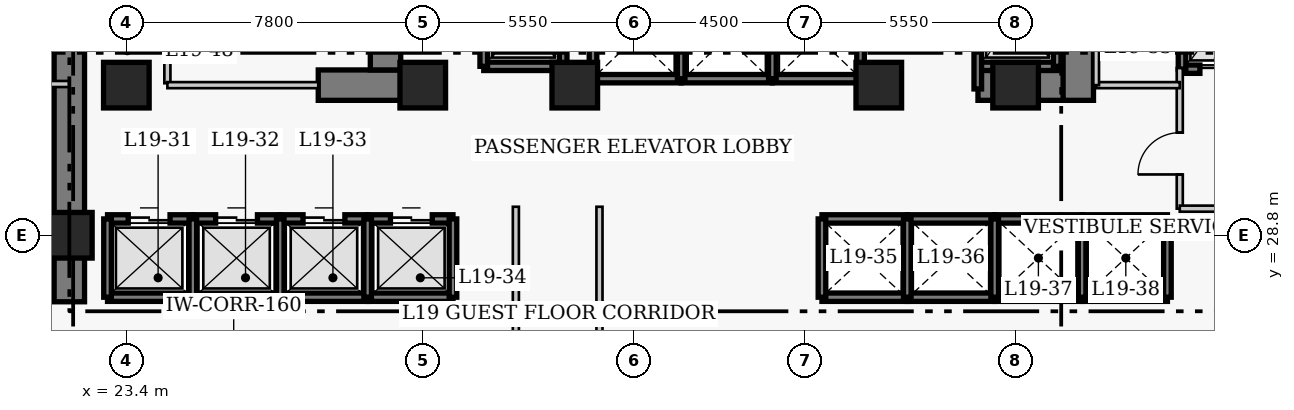
"""IFC4 building model, lengths in metres.
Left out: names, types, materials, properties, quantities, classifications, styles, units other than length and angle.
Written with IfcOpenShell. Run it as: python <this file> out.ifc"""

import sys

from ifc_helpers import new_model, si_unit, direction, frame, frame_2d, origin, origin_2d, place, context, subcontext, project, spatial, rectangle, extrude, element, fill, save


model = new_model("IFC4")
c1 = context("Model", 3, precision=1e-05, world=origin(), true_north=direction((0.0, 1.0)))
c2 = subcontext(c1, "Body", "Model", "MODEL_VIEW")
j1 = project(units=[si_unit("LENGTHUNIT", "METRE"), si_unit("PLANEANGLEUNIT", "RADIAN")], contexts=[c1])
p1 = place(None, origin())
s1 = spatial("IfcSite", under=j1, at=p1, CompositionType="ELEMENT")
p2 = place(p1, origin())
s2 = spatial("IfcBuilding", under=s1, at=p2, CompositionType="ELEMENT")
p3 = place(p2, frame((0.0, 0.0, 80.4)))
s3 = spatial("IfcBuildingStorey", under=s2, at=p3, CompositionType="ELEMENT", Elevation=80.4)
p4 = place(p3, frame((21.9, 27.05, 0.0), z_axis=(0.0, 0.0, 1.0), x_axis=(0.0, 1.0, 0.0)))
e1 = element("IfcWall", 1, at=p4, inside=s3, PredefinedType="SHEAR", context=c2, shape_type="SweptSolid", body=[
    extrude(rectangle(XDim=13.67, YDim=0.8, at=frame_2d((6.835, 0.0))), origin(), (0.0, 0.0, 1.0), 3.8),
])
p5 = place(p3, frame((28.45, 32.75, 0.0), z_axis=(0.0, 0.0, 1.0), x_axis=(1.0, 0.0, 0.0)))
e2 = element("IfcWall", 2, at=p5, inside=s3, PredefinedType="SHEAR", context=c2, shape_type="SweptSolid", body=[
    extrude(rectangle(XDim=2.4, YDim=0.8, at=frame_2d((1.2, 0.0))), origin(), (0.0, 0.0, 1.0), 3.8),
])
p6 = place(p3, frame((45.81, 32.75, 0.0), z_axis=(0.0, 0.0, 1.0), x_axis=(1.0, 0.0, 0.0)))
e3 = element("IfcWall", 3, at=p6, inside=s3, PredefinedType="SHEAR", context=c2, shape_type="SweptSolid", body=[
    extrude(rectangle(XDim=2.64, YDim=0.8, at=frame_2d((1.32, 0.0))), origin(), (0.0, 0.0, 1.0), 3.8),
])
p7 = place(p3, frame((30.22, 33.15, 0.0), z_axis=(0.0, 0.0, 1.0), x_axis=(0.0, 1.0, 0.0)))
e4 = element("IfcWall", 4, at=p7, inside=s3, PredefinedType="SHEAR", context=c2, shape_type="SweptSolid", body=[
    extrude(rectangle(XDim=7.17, YDim=0.8, at=frame_2d((3.585, 0.0))), origin(), (0.0, 0.0, 1.0), 3.8),
])
p8 = place(p3, frame((48.45, 32.35, 0.0), z_axis=(0.0, 0.0, 1.0), x_axis=(0.0, 1.0, 0.0)))
e5 = element("IfcWall", 5, at=p8, inside=s3, PredefinedType="SHEAR", context=c2, shape_type="SweptSolid", body=[
    extrude(rectangle(XDim=7.97, YDim=0.8, at=frame_2d((3.985, 0.0))), origin(), (0.0, 0.0, 1.0), 3.8),
])
p9 = place(p8, frame((5.85, 0.0, 0.0)))
e6 = element("IfcOpeningElement", 6, at=p9, cuts=e5, PredefinedType="OPENING", context=c2, shape_type="SweptSolid", body=[
    extrude(rectangle(XDim=1.1, YDim=2.15, at=frame_2d((0.55, 1.075))), frame((0.0, 0.41, 0.0), z_axis=(0.0, -1.0, 0.0), x_axis=(1.0, 0.0, 0.0)), (0.0, 0.0, 1.0), 0.82),
])
for number, where, z_axis, x_axis in (
    (7, (21.9, 28.8, 0.0), (0.0, 0.0, 1.0), (1.0, 0.0, 0.0)),
    (8, (23.4, 32.75, 0.0), (0.0, 0.0, 1.0), (1.0, 0.0, 0.0)),
    (9, (31.2, 32.75, 0.0), (0.0, 0.0, 1.0), (1.0, 0.0, 0.0)),
    (10, (35.2, 32.75, 0.0), (0.0, 0.0, 1.0), (1.0, 0.0, 0.0)),
    (11, (43.2, 32.75, 0.0), (0.0, 0.0, 1.0), (1.0, 0.0, 0.0)),
    (12, (46.8, 32.75, 0.0), (0.0, 0.0, 1.0), (1.0, 0.0, 0.0)),
):
    element("IfcColumn", number, at=place(p3, frame(where, z_axis=z_axis, x_axis=x_axis)), inside=s3, PredefinedType="COLUMN", context=c2, shape_type="SweptSolid", body=[
        extrude(rectangle(XDim=1.2, YDim=1.2, at=origin_2d()), origin(), (0.0, 0.0, 1.0), 3.8),
    ])
p10 = place(p3, frame((22.905, 29.23, 0.0), z_axis=(0.0, 0.0, 1.0), x_axis=(1.0, 0.0, 0.0)))
e13 = element("IfcWall", 13, at=p10, inside=s3, PredefinedType="SHEAR", context=c2, shape_type="SweptSolid", body=[
    extrude(rectangle(XDim=2.245, YDim=0.22, at=frame_2d((1.123, 0.0))), origin(), (0.0, 0.0, 1.0), 3.8),
])
p11 = place(p10, frame((0.545, 0.0, 0.0)))
e14 = element("IfcOpeningElement", 14, at=p11, cuts=e13, PredefinedType="OPENING", context=c2, shape_type="SweptSolid", body=[
    extrude(rectangle(XDim=1.1, YDim=2.15, at=frame_2d((0.55, 1.075))), frame((0.0, 0.12, 0.0), z_axis=(0.0, -1.0, 0.0), x_axis=(1.0, 0.0, 0.0)), (0.0, 0.0, 1.0), 0.24),
])
p12 = place(p3, frame((22.905, 27.17, 0.0), z_axis=(0.0, 0.0, 1.0), x_axis=(1.0, 0.0, 0.0)))
e15 = element("IfcWall", 15, at=p12, inside=s3, PredefinedType="SHEAR", context=c2, shape_type="SweptSolid", body=[
    extrude(rectangle(XDim=2.245, YDim=0.22, at=frame_2d((1.123, 0.0))), origin(), (0.0, 0.0, 1.0), 3.8),
])
p13 = place(p3, frame((22.905, 27.17, 0.0), z_axis=(0.0, 0.0, 1.0), x_axis=(0.0, 1.0, 0.0)))
e16 = element("IfcWall", 16, at=p13, inside=s3, PredefinedType="SHEAR", context=c2, shape_type="SweptSolid", body=[
    extrude(rectangle(XDim=2.06, YDim=0.2, at=frame_2d((1.03, 0.0))), origin(), (0.0, 0.0, 1.0), 3.8),
])
p14 = place(p3, frame((25.15, 29.23, 0.0), z_axis=(0.0, 0.0, 1.0), x_axis=(1.0, 0.0, 0.0)))
e17 = element("IfcWall", 17, at=p14, inside=s3, PredefinedType="SHEAR", context=c2, shape_type="SweptSolid", body=[
    extrude(rectangle(XDim=2.3, YDim=0.22, at=frame_2d((1.15, 0.0))), origin(), (0.0, 0.0, 1.0), 3.8),
])
p15 = place(p14, frame((0.6, 0.0, 0.0)))
e18 = element("IfcOpeningElement", 18, at=p15, cuts=e17, PredefinedType="OPENING", context=c2, shape_type="SweptSolid", body=[
    extrude(rectangle(XDim=1.1, YDim=2.15, at=frame_2d((0.55, 1.075))), frame((0.0, 0.12, 0.0), z_axis=(0.0, -1.0, 0.0), x_axis=(1.0, 0.0, 0.0)), (0.0, 0.0, 1.0), 0.24),
])
p16 = place(p3, frame((25.15, 27.17, 0.0), z_axis=(0.0, 0.0, 1.0), x_axis=(1.0, 0.0, 0.0)))
e19 = element("IfcWall", 19, at=p16, inside=s3, PredefinedType="SHEAR", context=c2, shape_type="SweptSolid", body=[
    extrude(rectangle(XDim=2.3, YDim=0.22, at=frame_2d((1.15, 0.0))), origin(), (0.0, 0.0, 1.0), 3.8),
])
p17 = place(p3, frame((25.15, 27.17, 0.0), z_axis=(0.0, 0.0, 1.0), x_axis=(0.0, 1.0, 0.0)))
e20 = element("IfcWall", 20, at=p17, inside=s3, PredefinedType="SHEAR", context=c2, shape_type="SweptSolid", body=[
    extrude(rectangle(XDim=2.06, YDim=0.2, at=frame_2d((1.03, 0.0))), origin(), (0.0, 0.0, 1.0), 3.8),
])
p18 = place(p3, frame((27.45, 29.23, 0.0), z_axis=(0.0, 0.0, 1.0), x_axis=(1.0, 0.0, 0.0)))
e21 = element("IfcWall", 21, at=p18, inside=s3, PredefinedType="SHEAR", context=c2, shape_type="SweptSolid", body=[
    extrude(rectangle(XDim=2.3, YDim=0.22, at=frame_2d((1.15, 0.0))), origin(), (0.0, 0.0, 1.0), 3.8),
])
p19 = place(p18, frame((0.6, 0.0, 0.0)))
e22 = element("IfcOpeningElement", 22, at=p19, cuts=e21, PredefinedType="OPENING", context=c2, shape_type="SweptSolid", body=[
    extrude(rectangle(XDim=1.1, YDim=2.15, at=frame_2d((0.55, 1.075))), frame((0.0, 0.12, 0.0), z_axis=(0.0, -1.0, 0.0), x_axis=(1.0, 0.0, 0.0)), (0.0, 0.0, 1.0), 0.24),
])
p20 = place(p3, frame((27.45, 27.17, 0.0), z_axis=(0.0, 0.0, 1.0), x_axis=(1.0, 0.0, 0.0)))
e23 = element("IfcWall", 23, at=p20, inside=s3, PredefinedType="SHEAR", context=c2, shape_type="SweptSolid", body=[
    extrude(rectangle(XDim=2.3, YDim=0.22, at=frame_2d((1.15, 0.0))), origin(), (0.0, 0.0, 1.0), 3.8),
])
p21 = place(p3, frame((27.45, 27.17, 0.0), z_axis=(0.0, 0.0, 1.0), x_axis=(0.0, 1.0, 0.0)))
e24 = element("IfcWall", 24, at=p21, inside=s3, PredefinedType="SHEAR", context=c2, shape_type="SweptSolid", body=[
    extrude(rectangle(XDim=2.06, YDim=0.2, at=frame_2d((1.03, 0.0))), origin(), (0.0, 0.0, 1.0), 3.8),
])
p22 = place(p3, frame((29.75, 29.23, 0.0), z_axis=(0.0, 0.0, 1.0), x_axis=(1.0, 0.0, 0.0)))
e25 = element("IfcWall", 25, at=p22, inside=s3, PredefinedType="SHEAR", context=c2, shape_type="SweptSolid", body=[
    extrude(rectangle(XDim=2.245, YDim=0.22, at=frame_2d((1.123, 0.0))), origin(), (0.0, 0.0, 1.0), 3.8),
])
p23 = place(p22, frame((0.6, 0.0, 0.0)))
e26 = element("IfcOpeningElement", 26, at=p23, cuts=e25, PredefinedType="OPENING", context=c2, shape_type="SweptSolid", body=[
    extrude(rectangle(XDim=1.1, YDim=2.15, at=frame_2d((0.55, 1.075))), frame((0.0, 0.12, 0.0), z_axis=(0.0, -1.0, 0.0), x_axis=(1.0, 0.0, 0.0)), (0.0, 0.0, 1.0), 0.24),
])
p24 = place(p3, frame((29.75, 27.17, 0.0), z_axis=(0.0, 0.0, 1.0), x_axis=(1.0, 0.0, 0.0)))
e27 = element("IfcWall", 27, at=p24, inside=s3, PredefinedType="SHEAR", context=c2, shape_type="SweptSolid", body=[
    extrude(rectangle(XDim=2.245, YDim=0.22, at=frame_2d((1.123, 0.0))), origin(), (0.0, 0.0, 1.0), 3.8),
])
for number, where, z_axis, x_axis in (
    (28, (29.75, 27.17, 0.0), (0.0, 0.0, 1.0), (0.0, 1.0, 0.0)),
    (29, (31.995, 27.17, 0.0), (0.0, 0.0, 1.0), (0.0, 1.0, 0.0)),
):
    element("IfcWall", number, at=place(p3, frame(where, z_axis=z_axis, x_axis=x_axis)), inside=s3, PredefinedType="SHEAR", context=c2, shape_type="SweptSolid", body=[
        extrude(rectangle(XDim=2.06, YDim=0.2, at=frame_2d((1.03, 0.0))), origin(), (0.0, 0.0, 1.0), 3.8),
    ])
for number, where, z_axis, x_axis in (
    (30, (41.705, 29.23, 0.0), (0.0, 0.0, 1.0), (1.0, 0.0, 0.0)),
    (31, (41.705, 27.17, 0.0), (0.0, 0.0, 1.0), (1.0, 0.0, 0.0)),
):
    element("IfcWall", number, at=place(p3, frame(where, z_axis=z_axis, x_axis=x_axis)), inside=s3, PredefinedType="SHEAR", context=c2, shape_type="SweptSolid", body=[
        extrude(rectangle(XDim=2.245, YDim=0.22, at=frame_2d((1.123, 0.0))), origin(), (0.0, 0.0, 1.0), 3.8),
    ])
p25 = place(p3, frame((41.705, 27.17, 0.0), z_axis=(0.0, 0.0, 1.0), x_axis=(0.0, 1.0, 0.0)))
e32 = element("IfcWall", 32, at=p25, inside=s3, PredefinedType="SHEAR", context=c2, shape_type="SweptSolid", body=[
    extrude(rectangle(XDim=2.06, YDim=0.2, at=frame_2d((1.03, 0.0))), origin(), (0.0, 0.0, 1.0), 3.8),
])
for number, where, z_axis, x_axis in (
    (33, (43.95, 29.23, 0.0), (0.0, 0.0, 1.0), (1.0, 0.0, 0.0)),
    (34, (43.95, 27.17, 0.0), (0.0, 0.0, 1.0), (1.0, 0.0, 0.0)),
):
    element("IfcWall", number, at=place(p3, frame(where, z_axis=z_axis, x_axis=x_axis)), inside=s3, PredefinedType="SHEAR", context=c2, shape_type="SweptSolid", body=[
        extrude(rectangle(XDim=2.3, YDim=0.22, at=frame_2d((1.15, 0.0))), origin(), (0.0, 0.0, 1.0), 3.8),
    ])
p26 = place(p3, frame((43.95, 27.17, 0.0), z_axis=(0.0, 0.0, 1.0), x_axis=(0.0, 1.0, 0.0)))
e35 = element("IfcWall", 35, at=p26, inside=s3, PredefinedType="SHEAR", context=c2, shape_type="SweptSolid", body=[
    extrude(rectangle(XDim=2.06, YDim=0.2, at=frame_2d((1.03, 0.0))), origin(), (0.0, 0.0, 1.0), 3.8),
])
for number, where, z_axis, x_axis in (
    (36, (46.25, 29.23, 0.0), (0.0, 0.0, 1.0), (1.0, 0.0, 0.0)),
    (37, (46.25, 27.17, 0.0), (0.0, 0.0, 1.0), (1.0, 0.0, 0.0)),
):
    element("IfcWall", number, at=place(p3, frame(where, z_axis=z_axis, x_axis=x_axis)), inside=s3, PredefinedType="SHEAR", context=c2, shape_type="SweptSolid", body=[
        extrude(rectangle(XDim=2.3, YDim=0.22, at=frame_2d((1.15, 0.0))), origin(), (0.0, 0.0, 1.0), 3.8),
    ])
p27 = place(p3, frame((46.25, 27.17, 0.0), z_axis=(0.0, 0.0, 1.0), x_axis=(0.0, 1.0, 0.0)))
e38 = element("IfcWall", 38, at=p27, inside=s3, PredefinedType="SHEAR", context=c2, shape_type="SweptSolid", body=[
    extrude(rectangle(XDim=2.06, YDim=0.2, at=frame_2d((1.03, 0.0))), origin(), (0.0, 0.0, 1.0), 3.8),
])
for number, where, z_axis, x_axis in (
    (39, (48.55, 29.23, 0.0), (0.0, 0.0, 1.0), (1.0, 0.0, 0.0)),
    (40, (48.55, 27.17, 0.0), (0.0, 0.0, 1.0), (1.0, 0.0, 0.0)),
):
    element("IfcWall", number, at=place(p3, frame(where, z_axis=z_axis, x_axis=x_axis)), inside=s3, PredefinedType="SHEAR", context=c2, shape_type="SweptSolid", body=[
        extrude(rectangle(XDim=2.245, YDim=0.22, at=frame_2d((1.123, 0.0))), origin(), (0.0, 0.0, 1.0), 3.8),
    ])
for number, where, z_axis, x_axis in (
    (41, (48.55, 27.17, 0.0), (0.0, 0.0, 1.0), (0.0, 1.0, 0.0)),
    (42, (50.795, 27.17, 0.0), (0.0, 0.0, 1.0), (0.0, 1.0, 0.0)),
):
    element("IfcWall", number, at=place(p3, frame(where, z_axis=z_axis, x_axis=x_axis)), inside=s3, PredefinedType="SHEAR", context=c2, shape_type="SweptSolid", body=[
        extrude(rectangle(XDim=2.06, YDim=0.2, at=frame_2d((1.03, 0.0))), origin(), (0.0, 0.0, 1.0), 3.8),
    ])
p28 = place(p3, frame((35.68, 32.92, 0.0), z_axis=(0.0, 0.0, 1.0), x_axis=(1.0, 0.0, 0.0)))
e43 = element("IfcWall", 43, at=p28, inside=s3, PredefinedType="SHEAR", context=c2, shape_type="SweptSolid", body=[
    extrude(rectangle(XDim=2.32, YDim=0.22, at=frame_2d((1.16, 0.0))), origin(), (0.0, 0.0, 1.0), 3.8),
])
p29 = place(p3, frame((35.68, 32.92, 0.0), z_axis=(0.0, 0.0, 1.0), x_axis=(0.0, 1.0, 0.0)))
e44 = element("IfcWall", 44, at=p29, inside=s3, PredefinedType="SHEAR", context=c2, shape_type="SweptSolid", body=[
    extrude(rectangle(XDim=2.16, YDim=0.2, at=frame_2d((1.08, 0.0))), origin(), (0.0, 0.0, 1.0), 3.8),
])
p30 = place(p3, frame((38.0, 32.92, 0.0), z_axis=(0.0, 0.0, 1.0), x_axis=(1.0, 0.0, 0.0)))
e45 = element("IfcWall", 45, at=p30, inside=s3, PredefinedType="SHEAR", context=c2, shape_type="SweptSolid", body=[
    extrude(rectangle(XDim=2.4, YDim=0.22, at=frame_2d((1.2, 0.0))), origin(), (0.0, 0.0, 1.0), 3.8),
])
p31 = place(p3, frame((38.0, 32.92, 0.0), z_axis=(0.0, 0.0, 1.0), x_axis=(0.0, 1.0, 0.0)))
e46 = element("IfcWall", 46, at=p31, inside=s3, PredefinedType="SHEAR", context=c2, shape_type="SweptSolid", body=[
    extrude(rectangle(XDim=2.16, YDim=0.2, at=frame_2d((1.08, 0.0))), origin(), (0.0, 0.0, 1.0), 3.8),
])
p32 = place(p3, frame((40.4, 32.92, 0.0), z_axis=(0.0, 0.0, 1.0), x_axis=(1.0, 0.0, 0.0)))
e47 = element("IfcWall", 47, at=p32, inside=s3, PredefinedType="SHEAR", context=c2, shape_type="SweptSolid", body=[
    extrude(rectangle(XDim=2.32, YDim=0.22, at=frame_2d((1.16, 0.0))), origin(), (0.0, 0.0, 1.0), 3.8),
])
for number, where, z_axis, x_axis in (
    (48, (40.4, 32.92, 0.0), (0.0, 0.0, 1.0), (0.0, 1.0, 0.0)),
    (49, (42.72, 32.92, 0.0), (0.0, 0.0, 1.0), (0.0, 1.0, 0.0)),
):
    element("IfcWall", number, at=place(p3, frame(where, z_axis=z_axis, x_axis=x_axis)), inside=s3, PredefinedType="SHEAR", context=c2, shape_type="SweptSolid", body=[
        extrude(rectangle(XDim=2.16, YDim=0.2, at=frame_2d((1.08, 0.0))), origin(), (0.0, 0.0, 1.0), 3.8),
    ])
p33 = place(p3, frame((51.18, 33.17, 0.0), z_axis=(0.0, 0.0, 1.0), x_axis=(1.0, 0.0, 0.0)))
e50 = element("IfcWall", 50, at=p33, inside=s3, PredefinedType="SHEAR", context=c2, shape_type="SweptSolid", body=[
    extrude(rectangle(XDim=2.42, YDim=0.22, at=frame_2d((1.21, 0.0))), origin(), (0.0, 0.0, 1.0), 3.8),
])
p34 = place(p33, frame((0.47, 0.0, 0.0)))
e51 = element("IfcOpeningElement", 51, at=p34, cuts=e50, PredefinedType="OPENING", context=c2, shape_type="SweptSolid", body=[
    extrude(rectangle(XDim=1.3, YDim=2.15, at=frame_2d((0.65, 1.075))), frame((0.0, 0.12, 0.0), z_axis=(0.0, -1.0, 0.0), x_axis=(1.0, 0.0, 0.0)), (0.0, 0.0, 1.0), 0.24),
])
p35 = place(p3, frame((51.18, 33.17, 0.0), z_axis=(0.0, 0.0, 1.0), x_axis=(0.0, 1.0, 0.0)))
e52 = element("IfcWall", 52, at=p35, inside=s3, PredefinedType="SHEAR", context=c2, shape_type="SweptSolid", body=[
    extrude(rectangle(XDim=2.86, YDim=0.2, at=frame_2d((1.43, 0.0))), origin(), (0.0, 0.0, 1.0), 3.8),
])
p36 = place(p3, frame((32.805, 33.245, 0.0), z_axis=(0.0, 0.0, 1.0), x_axis=(1.0, 0.0, 0.0)))
e53 = element("IfcWall", 53, at=p36, inside=s3, PredefinedType="SHEAR", context=c2, shape_type="SweptSolid", body=[
    extrude(rectangle(XDim=2.09, YDim=0.22, at=frame_2d((1.045, 0.0))), origin(), (0.0, 0.0, 1.0), 3.8),
])
for number, where, z_axis, x_axis in (
    (54, (32.805, 33.245, 0.0), (0.0, 0.0, 1.0), (0.0, 1.0, 0.0)),
    (55, (34.895, 33.245, 0.0), (0.0, 0.0, 1.0), (0.0, 1.0, 0.0)),
):
    element("IfcWall", number, at=place(p3, frame(where, z_axis=z_axis, x_axis=x_axis)), inside=s3, PredefinedType="SHEAR", context=c2, shape_type="SweptSolid", body=[
        extrude(rectangle(XDim=2.91, YDim=0.2, at=frame_2d((1.455, 0.0))), origin(), (0.0, 0.0, 1.0), 3.8),
    ])
p37 = place(p3, frame((45.805, 33.245, 0.0), z_axis=(0.0, 0.0, 1.0), x_axis=(1.0, 0.0, 0.0)))
e56 = element("IfcWall", 56, at=p37, inside=s3, PredefinedType="SHEAR", context=c2, shape_type="SweptSolid", body=[
    extrude(rectangle(XDim=2.09, YDim=0.22, at=frame_2d((1.045, 0.0))), origin(), (0.0, 0.0, 1.0), 3.8),
])
p38 = place(p3, frame((45.805, 32.65, 0.0), z_axis=(0.0, 0.0, 1.0), x_axis=(0.0, 1.0, 0.0)))
e57 = element("IfcWall", 57, at=p38, inside=s3, PredefinedType="SHEAR", context=c2, shape_type="SweptSolid", body=[
    extrude(rectangle(XDim=3.505, YDim=0.2, at=frame_2d((1.752, 0.0))), origin(), (0.0, 0.0, 1.0), 3.8),
])
p39 = place(p3, frame((47.895, 33.245, 0.0), z_axis=(0.0, 0.0, 1.0), x_axis=(0.0, 1.0, 0.0)))
e58 = element("IfcWall", 58, at=p39, inside=s3, PredefinedType="SHEAR", context=c2, shape_type="SweptSolid", body=[
    extrude(rectangle(XDim=2.91, YDim=0.2, at=frame_2d((1.455, 0.0))), origin(), (0.0, 0.0, 1.0), 3.8),
])
p40 = place(p3, frame((24.48, 32.8, 0.0), z_axis=(0.0, 0.0, 1.0), x_axis=(0.0, 1.0, 0.0)))
e59 = element("IfcWall", 59, at=p40, inside=s3, PredefinedType="PARTITIONING", context=c2, shape_type="SweptSolid", body=[
    extrude(rectangle(XDim=3.57, YDim=0.16, at=frame_2d((1.785, 0.0))), origin(), (0.0, 0.0, 1.0), 3.54),
])
p41 = place(p40, frame((1.604, 0.0, 0.0)))
e60 = element("IfcOpeningElement", 60, at=p41, cuts=e59, PredefinedType="OPENING", context=c2, shape_type="SweptSolid", body=[
    extrude(rectangle(XDim=0.9, YDim=2.1, at=frame_2d((0.45, 1.05))), frame((0.0, 0.09, 0.0), z_axis=(0.0, -1.0, 0.0), x_axis=(1.0, 0.0, 0.0)), (0.0, 0.0, 1.0), 0.18),
])
p42 = place(p3, frame((51.12, 29.5, 0.0), z_axis=(0.0, 0.0, 1.0), x_axis=(0.0, 1.0, 0.0)))
e61 = element("IfcWall", 61, at=p42, inside=s3, PredefinedType="PARTITIONING", context=c2, shape_type="SweptSolid", body=[
    extrude(rectangle(XDim=3.7, YDim=0.16, at=frame_2d((1.85, 0.0))), origin(), (0.0, 0.0, 1.0), 3.54),
])
p43 = place(p42, frame((0.9, 0.0, 0.0)))
e62 = element("IfcOpeningElement", 62, at=p43, cuts=e61, PredefinedType="OPENING", context=c2, shape_type="SweptSolid", body=[
    extrude(rectangle(XDim=1.1, YDim=2.15, at=frame_2d((0.55, 1.075))), frame((0.0, 0.09, 0.0), z_axis=(0.0, -1.0, 0.0), x_axis=(1.0, 0.0, 0.0)), (0.0, 0.0, 1.0), 0.18),
])
p44 = place(p3, frame((51.12, 29.5, 0.0), z_axis=(0.0, 0.0, 1.0), x_axis=(1.0, 0.0, 0.0)))
e63 = element("IfcWall", 63, at=p44, inside=s3, PredefinedType="PARTITIONING", context=c2, shape_type="SweptSolid", body=[
    extrude(rectangle(XDim=5.63, YDim=0.16, at=frame_2d((2.815, 0.0))), origin(), (0.0, 0.0, 1.0), 3.54),
])
p45 = place(p3, frame((24.48, 32.75, 0.0), z_axis=(0.0, 0.0, 1.0), x_axis=(1.0, 0.0, 0.0)))
e64 = element("IfcWall", 64, at=p45, inside=s3, PredefinedType="PARTITIONING", context=c2, shape_type="SweptSolid", body=[
    extrude(rectangle(XDim=3.97, YDim=0.16, at=frame_2d((1.985, 0.0))), origin(), (0.0, 0.0, 1.0), 3.54),
])
p46 = place(p3, frame((48.92, 32.75, 0.0), z_axis=(0.0, 0.0, 1.0), x_axis=(1.0, 0.0, 0.0)))
e65 = element("IfcWall", 65, at=p46, inside=s3, PredefinedType="PARTITIONING", context=c2, shape_type="SweptSolid", body=[
    extrude(rectangle(XDim=2.2, YDim=0.16, at=frame_2d((1.1, 0.0))), origin(), (0.0, 0.0, 1.0), 3.54),
])
p47 = place(p3, frame((48.92, 32.75, 0.0), z_axis=(0.0, 0.0, 1.0), x_axis=(0.0, 1.0, 0.0)))
e66 = element("IfcWall", 66, at=p47, inside=s3, PredefinedType="PARTITIONING", context=c2, shape_type="SweptSolid", body=[
    extrude(rectangle(XDim=3.62, YDim=0.15, at=frame_2d((1.81, 0.0))), origin(), (0.0, 0.0, 1.0), 3.54),
])
for number, where, z_axis, x_axis in (
    (67, (33.65, 26.11, 0.0), (0.0, 0.0, 1.0), (0.0, 1.0, 0.0)),
    (68, (35.85, 26.11, 0.0), (0.0, 0.0, 1.0), (0.0, 1.0, 0.0)),
):
    element("IfcWall", number, at=place(p3, frame(where, z_axis=z_axis, x_axis=x_axis)), inside=s3, PredefinedType="PARTITIONING", context=c2, shape_type="SweptSolid", body=[
        extrude(rectangle(XDim=3.44, YDim=0.16, at=frame_2d((1.72, 0.0))), origin(), (0.0, 0.0, 1.0), 3.54),
    ])
p48 = place(p3, frame((18.86, 32.78, 0.0), z_axis=(0.0, 0.0, 1.0), x_axis=(1.0, 0.0, 0.0)))
e69 = element("IfcWall", 69, at=p48, inside=s3, PredefinedType="PARTITIONING", context=c2, shape_type="SweptSolid", body=[
    extrude(rectangle(XDim=3.04, YDim=0.16, at=frame_2d((1.52, 0.0))), origin(), (0.0, 0.0, 1.0), 3.54),
])
p49 = place(p11, origin())
e70 = element("IfcDoor", 70, at=p49, inside=s3, OperationType="DOUBLE_DOOR_SLIDING", PredefinedType="DOOR", context=c2, shape_type="SweptSolid", body=[
    extrude(rectangle(XDim=1.1, YDim=2.15, at=frame_2d((0.55, 1.075))), frame((0.0, 0.025, 0.0), z_axis=(0.0, -1.0, 0.0), x_axis=(1.0, 0.0, 0.0)), (0.0, 0.0, 1.0), 0.05),
])
fill(e14, e70)
p50 = place(p15, origin())
e71 = element("IfcDoor", 71, at=p50, inside=s3, OperationType="DOUBLE_DOOR_SLIDING", PredefinedType="DOOR", context=c2, shape_type="SweptSolid", body=[
    extrude(rectangle(XDim=1.1, YDim=2.15, at=frame_2d((0.55, 1.075))), frame((0.0, 0.025, 0.0), z_axis=(0.0, -1.0, 0.0), x_axis=(1.0, 0.0, 0.0)), (0.0, 0.0, 1.0), 0.05),
])
fill(e18, e71)
p51 = place(p19, origin())
e72 = element("IfcDoor", 72, at=p51, inside=s3, OperationType="DOUBLE_DOOR_SLIDING", PredefinedType="DOOR", context=c2, shape_type="SweptSolid", body=[
    extrude(rectangle(XDim=1.1, YDim=2.15, at=frame_2d((0.55, 1.075))), frame((0.0, 0.025, 0.0), z_axis=(0.0, -1.0, 0.0), x_axis=(1.0, 0.0, 0.0)), (0.0, 0.0, 1.0), 0.05),
])
fill(e22, e72)
p52 = place(p23, origin())
e73 = element("IfcDoor", 73, at=p52, inside=s3, OperationType="DOUBLE_DOOR_SLIDING", PredefinedType="DOOR", context=c2, shape_type="SweptSolid", body=[
    extrude(rectangle(XDim=1.1, YDim=2.15, at=frame_2d((0.55, 1.075))), frame((0.0, 0.025, 0.0), z_axis=(0.0, -1.0, 0.0), x_axis=(1.0, 0.0, 0.0)), (0.0, 0.0, 1.0), 0.05),
])
fill(e26, e73)
p53 = place(p34, origin())
e74 = element("IfcDoor", 74, at=p53, inside=s3, OperationType="DOUBLE_DOOR_SLIDING", PredefinedType="DOOR", context=c2, shape_type="SweptSolid", body=[
    extrude(rectangle(XDim=1.3, YDim=2.15, at=frame_2d((0.65, 1.075))), frame((0.0, 0.025, 0.0), z_axis=(0.0, -1.0, 0.0), x_axis=(1.0, 0.0, 0.0)), (0.0, 0.0, 1.0), 0.05),
])
fill(e51, e74)
p54 = place(p43, origin())
e75 = element("IfcDoor", 75, at=p54, inside=s3, OperationType="SINGLE_SWING_LEFT", PredefinedType="DOOR", context=c2, shape_type="SweptSolid", body=[
    extrude(rectangle(XDim=1.1, YDim=2.15, at=frame_2d((0.55, 1.075))), frame((0.0, 0.025, 0.0), z_axis=(0.0, -1.0, 0.0), x_axis=(1.0, 0.0, 0.0)), (0.0, 0.0, 1.0), 0.05),
])
fill(e62, e75)
save(model, sys.argv[1])
